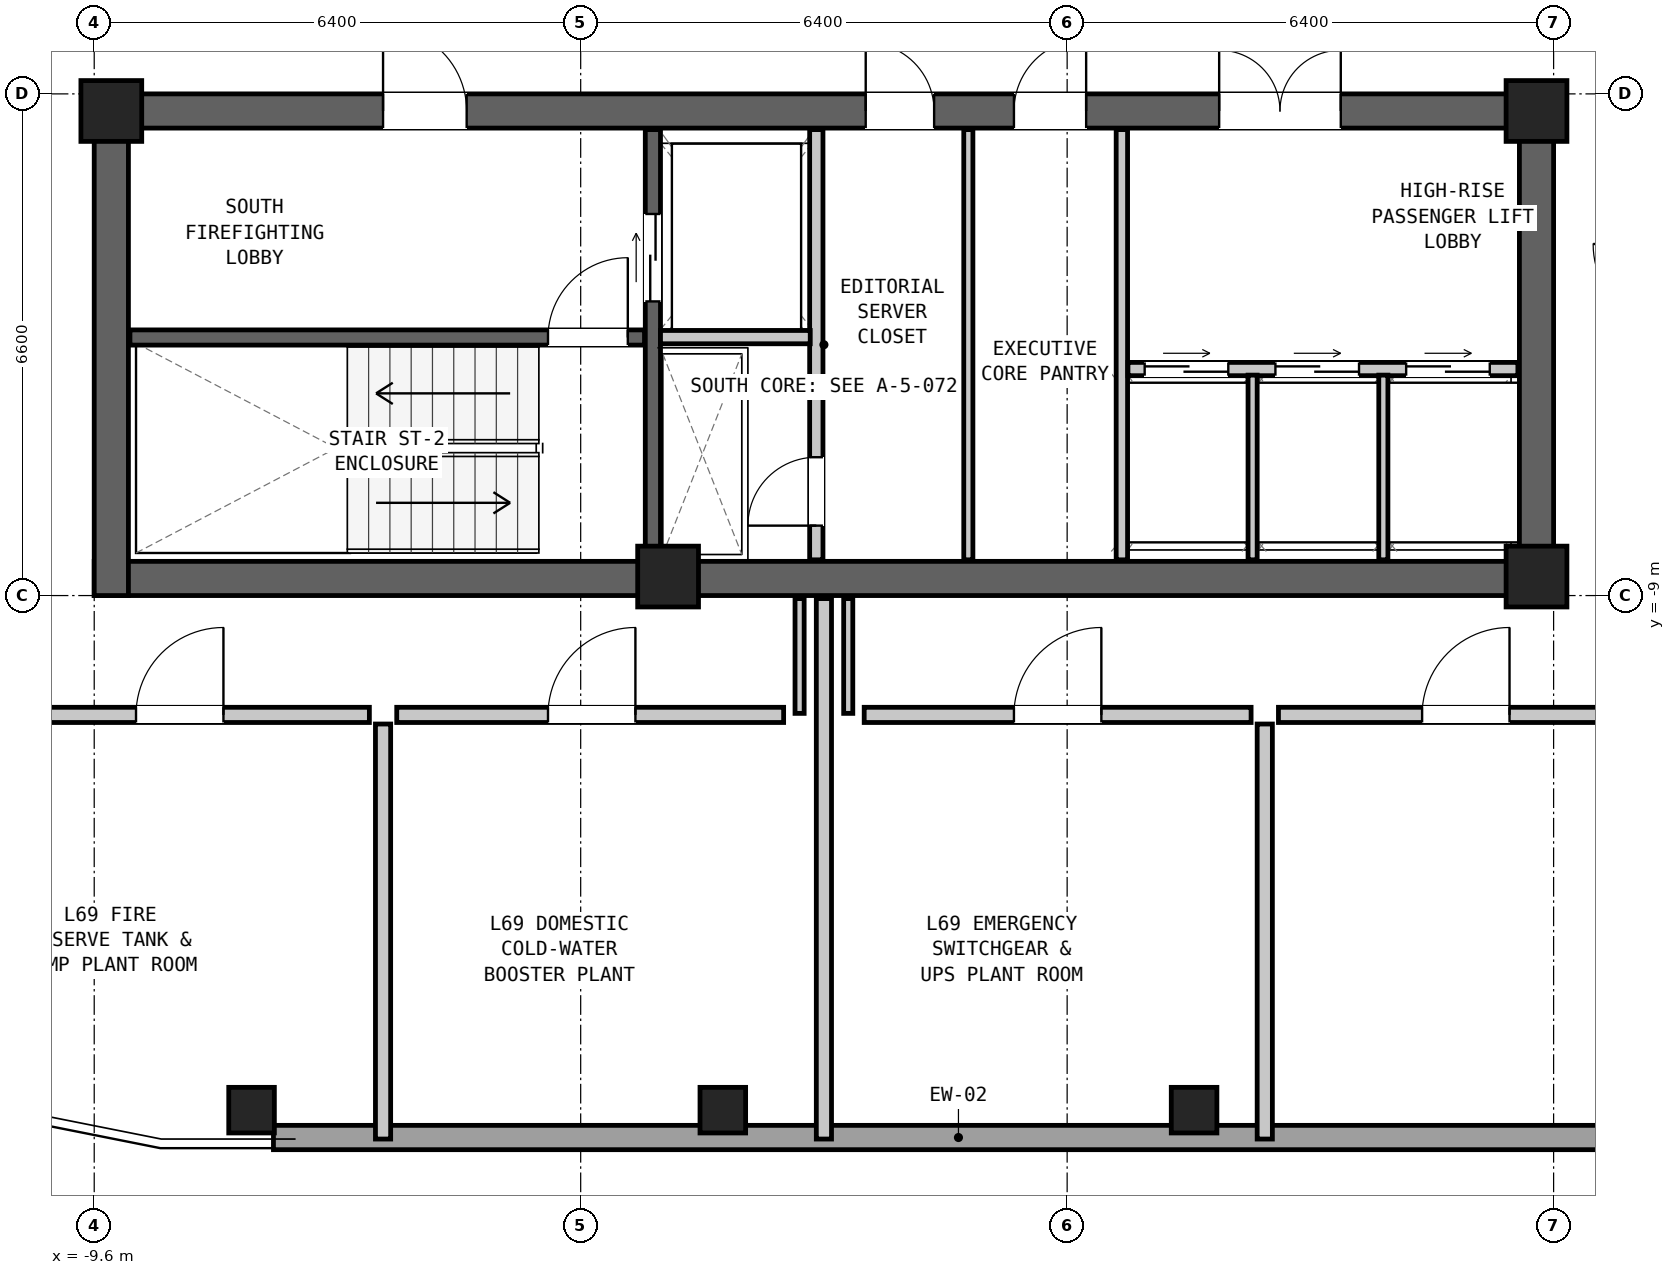
"""IFC4 building model, lengths in metres.
Left out: names, types, materials, properties, quantities, classifications, styles, units other than length and angle.
Written with IfcOpenShell. Run it as: python <this file> out.ifc"""

import sys

from ifc_helpers import new_model, si_unit, direction, frame, frame_2d, origin, origin_2d, place, context, subcontext, project, spatial, rectangle, hollow_rectangle, extrude, element, fill, save


model = new_model("IFC4")
c1 = context("Model", 3, precision=1e-05, world=origin(), true_north=direction((0.0, 1.0)))
c2 = subcontext(c1, "Body", "Model", "MODEL_VIEW")
j1 = project(units=[si_unit("LENGTHUNIT", "METRE"), si_unit("PLANEANGLEUNIT", "RADIAN")], contexts=[c1])
p1 = place(None, origin())
s1 = spatial("IfcSite", under=j1, at=p1, CompositionType="ELEMENT")
p2 = place(p1, origin())
s2 = spatial("IfcBuilding", under=s1, at=p2, CompositionType="ELEMENT")
p3 = place(p2, frame((0.0, 0.0, 234.9)))
s3 = spatial("IfcBuildingStorey", under=s2, at=p3, CompositionType="ELEMENT", Elevation=234.9)
p4 = place(p3, frame((-9.6, -8.775, 0.0), z_axis=(0.0, 0.0, 1.0), x_axis=(1.0, 0.0, 0.0)))
e1 = element("IfcWall", 1, at=p4, inside=s3, PredefinedType="SHEAR", context=c2, shape_type="SweptSolid", body=[
    extrude(rectangle(XDim=19.2, YDim=0.45, at=frame_2d((9.6, 0.0))), origin(), (0.0, 0.0, 1.0), 3.6),
])
p5 = place(p3, frame((-9.6, -2.625, 0.0), z_axis=(0.0, 0.0, 1.0), x_axis=(1.0, 0.0, 0.0)))
e2 = element("IfcWall", 2, at=p5, inside=s3, PredefinedType="SHEAR", context=c2, shape_type="SweptSolid", body=[
    extrude(rectangle(XDim=19.2, YDim=0.45, at=frame_2d((9.6, 0.0))), origin(), (0.0, 0.0, 1.0), 3.6),
])
p6 = place(p5, frame((3.8, 0.0, 0.0)))
e3 = element("IfcOpeningElement", 3, at=p6, cuts=e2, PredefinedType="OPENING", context=c2, shape_type="SweptSolid", body=[
    extrude(rectangle(XDim=1.1, YDim=2.08, at=frame_2d((0.55, 1.04))), frame((0.0, 0.237, 0.0), z_axis=(0.0, -1.0, 0.0), x_axis=(1.0, 0.0, 0.0)), (0.0, 0.0, 1.0), 0.474),
])
p7 = place(p5, frame((10.15, 0.0, 0.0)))
e4 = element("IfcOpeningElement", 4, at=p7, cuts=e2, PredefinedType="OPENING", context=c2, shape_type="SweptSolid", body=[
    extrude(rectangle(XDim=0.9, YDim=2.05, at=frame_2d((0.45, 1.025))), frame((0.0, 0.237, 0.0), z_axis=(0.0, -1.0, 0.0), x_axis=(1.0, 0.0, 0.0)), (0.0, 0.0, 1.0), 0.474),
])
p8 = place(p5, frame((12.1, 0.0, 0.0)))
e5 = element("IfcOpeningElement", 5, at=p8, cuts=e2, PredefinedType="OPENING", context=c2, shape_type="SweptSolid", body=[
    extrude(rectangle(XDim=0.95, YDim=2.1, at=frame_2d((0.475, 1.05))), frame((0.0, 0.237, 0.0), z_axis=(0.0, -1.0, 0.0), x_axis=(1.0, 0.0, 0.0)), (0.0, 0.0, 1.0), 0.474),
])
p9 = place(p5, frame((14.8, 0.0, 0.0)))
e6 = element("IfcOpeningElement", 6, at=p9, cuts=e2, PredefinedType="OPENING", context=c2, shape_type="SweptSolid", body=[
    extrude(rectangle(XDim=1.6, YDim=2.12, at=frame_2d((0.8, 1.06))), frame((0.0, 0.237, 0.0), z_axis=(0.0, -1.0, 0.0), x_axis=(1.0, 0.0, 0.0)), (0.0, 0.0, 1.0), 0.474),
])
for number, where, z_axis, x_axis in (
    (7, (-9.375, -9.0, 0.0), (0.0, 0.0, 1.0), (0.0, 1.0, 0.0)),
    (8, (9.375, -9.0, 0.0), (0.0, 0.0, 1.0), (0.0, 1.0, 0.0)),
):
    element("IfcWall", number, at=place(p3, frame(where, z_axis=z_axis, x_axis=x_axis)), inside=s3, PredefinedType="SHEAR", context=c2, shape_type="SweptSolid", body=[
        extrude(rectangle(XDim=6.6, YDim=0.45, at=frame_2d((3.3, 0.0))), origin(), (0.0, 0.0, 1.0), 3.6),
    ])
for number, where, z_axis, x_axis in (
    (9, (-7.53, -15.77, 0.0), (0.0, 0.0, 1.0), (1.0, 0.0, 0.0)),
    (10, (-1.33, -15.77, 0.0), (0.0, 0.0, 1.0), (1.0, 0.0, 0.0)),
    (11, (4.87, -15.77, 0.0), (0.0, 0.0, 1.0), (1.0, 0.0, 0.0)),
):
    element("IfcColumn", number, at=place(p3, frame(where, z_axis=z_axis, x_axis=x_axis)), inside=s3, PredefinedType="COLUMN", context=c2, shape_type="SweptSolid", body=[
        extrude(hollow_rectangle(XDim=0.6, YDim=0.6, WallThickness=0.04, at=origin_2d()), origin(), (0.0, 0.0, 1.0), 3.6),
    ])
for number, where, z_axis, x_axis in (
    (12, (-9.375, -2.625, 0.0), (0.0, 0.0, 1.0), (1.0, 0.0, 0.0)),
    (13, (9.375, -2.625, 0.0), (0.0, 0.0, 1.0), (1.0, 0.0, 0.0)),
    (14, (-2.05, -8.75, 0.0), (0.0, 0.0, 1.0), (1.0, 0.0, 0.0)),
    (15, (9.375, -8.75, 0.0), (0.0, 0.0, 1.0), (1.0, 0.0, 0.0)),
):
    element("IfcColumn", number, at=place(p3, frame(where, z_axis=z_axis, x_axis=x_axis)), inside=s3, PredefinedType="COLUMN", context=c2, shape_type="SweptSolid", body=[
        extrude(rectangle(XDim=0.8, YDim=0.8, at=origin_2d()), origin(), (0.0, 0.0, 1.0), 3.6),
    ])
p10 = place(p3, frame((10.782, -16.13, 0.0), z_axis=(0.0, 0.0, 1.0), x_axis=(-1.0, 0.0, 0.0)))
e16 = element("IfcWall", 16, at=p10, inside=s3, PredefinedType="SOLIDWALL", context=c2, shape_type="SweptSolid", body=[
    extrude(rectangle(XDim=18.024, YDim=0.32, at=frame_2d((9.012, 0.0))), origin(), (0.0, 0.0, 1.0), 2.082),
])
p11 = place(p3, frame((-9.13, -5.605, 0.0), z_axis=(0.0, 0.0, 1.0), x_axis=(1.0, 0.0, 0.0)))
e17 = element("IfcWall", 17, at=p11, inside=s3, PredefinedType="SHEAR", context=c2, shape_type="SweptSolid", body=[
    extrude(rectangle(XDim=6.77, YDim=0.2, at=frame_2d((3.385, 0.0))), origin(), (0.0, 0.0, 1.0), 3.22),
])
p12 = place(p11, frame((5.5, 0.0, 0.0)))
e18 = element("IfcOpeningElement", 18, at=p12, cuts=e17, PredefinedType="OPENING", context=c2, shape_type="SweptSolid", body=[
    extrude(rectangle(XDim=1.05, YDim=2.08, at=frame_2d((0.525, 1.04))), frame((0.0, 0.112, 0.0), z_axis=(0.0, -1.0, 0.0), x_axis=(1.0, 0.0, 0.0)), (0.0, 0.0, 1.0), 0.224),
])
p13 = place(p3, frame((-2.25, -8.53, 0.0), z_axis=(0.0, 0.0, 1.0), x_axis=(0.0, 1.0, 0.0)))
e19 = element("IfcWall", 19, at=p13, inside=s3, PredefinedType="SHEAR", context=c2, shape_type="SweptSolid", body=[
    extrude(rectangle(XDim=5.66, YDim=0.2, at=frame_2d((2.83, 0.0))), origin(), (0.0, 0.0, 1.0), 3.22),
])
p14 = place(p13, frame((3.4, 0.0, 0.0)))
e20 = element("IfcOpeningElement", 20, at=p14, cuts=e19, PredefinedType="OPENING", context=c2, shape_type="SweptSolid", body=[
    extrude(rectangle(XDim=1.15, YDim=2.08, at=frame_2d((0.575, 1.04))), frame((0.0, 0.112, 0.0), z_axis=(0.0, -1.0, 0.0), x_axis=(1.0, 0.0, 0.0)), (0.0, 0.0, 1.0), 0.224),
])
p15 = place(p3, frame((-0.1, -8.53, 0.0), z_axis=(0.0, 0.0, 1.0), x_axis=(0.0, 1.0, 0.0)))
e21 = element("IfcWall", 21, at=p15, inside=s3, PredefinedType="PARTITIONING", context=c2, shape_type="SweptSolid", body=[
    extrude(rectangle(XDim=5.66, YDim=0.175, at=frame_2d((2.83, 0.0))), origin(), (0.0, 0.0, 1.0), 3.22),
])
p16 = place(p15, frame((0.45, 0.0, 0.0)))
e22 = element("IfcOpeningElement", 22, at=p16, cuts=e21, PredefinedType="OPENING", context=c2, shape_type="SweptSolid", body=[
    extrude(rectangle(XDim=0.9, YDim=2.05, at=frame_2d((0.45, 1.025))), frame((0.0, 0.1, 0.0), z_axis=(0.0, -1.0, 0.0), x_axis=(1.0, 0.0, 0.0)), (0.0, 0.0, 1.0), 0.199),
])
p17 = place(p3, frame((-2.15, -5.6, 0.0), z_axis=(0.0, 0.0, 1.0), x_axis=(1.0, 0.0, 0.0)))
e23 = element("IfcWall", 23, at=p17, inside=s3, PredefinedType="PARTITIONING", context=c2, shape_type="SweptSolid", body=[
    extrude(rectangle(XDim=1.97, YDim=0.175, at=frame_2d((0.985, 0.0))), origin(), (0.0, 0.0, 1.0), 3.22),
])
p18 = place(p3, frame((3.92, -8.53, 0.0), z_axis=(0.0, 0.0, 1.0), x_axis=(0.0, 1.0, 0.0)))
e24 = element("IfcWall", 24, at=p18, inside=s3, PredefinedType="PARTITIONING", context=c2, shape_type="SweptSolid", body=[
    extrude(rectangle(XDim=5.66, YDim=0.15, at=frame_2d((2.83, 0.0))), origin(), (0.0, 0.0, 1.0), 3.22),
])
p19 = place(p3, frame((1.9, -8.53, 0.0), z_axis=(0.0, 0.0, 1.0), x_axis=(0.0, 1.0, 0.0)))
e25 = element("IfcWall", 25, at=p19, inside=s3, PredefinedType="PARTITIONING", context=c2, shape_type="SweptSolid", body=[
    extrude(rectangle(XDim=5.66, YDim=0.12, at=frame_2d((2.83, 0.0))), origin(), (0.0, 0.0, 1.0), 3.22),
])
p20 = place(p3, frame((4.0, -6.02, 0.0), z_axis=(0.0, 0.0, 1.0), x_axis=(1.0, 0.0, 0.0)))
e26 = element("IfcWall", 26, at=p20, inside=s3, PredefinedType="PARTITIONING", context=c2, shape_type="SweptSolid", body=[
    extrude(rectangle(XDim=5.13, YDim=0.175, at=frame_2d((2.565, 0.0))), origin(), (0.0, 0.0, 1.0), 3.22),
])
p21 = place(p20, frame((0.22, 0.0, 0.0)))
e27 = element("IfcOpeningElement", 27, at=p21, cuts=e26, PredefinedType="OPENING", context=c2, shape_type="SweptSolid", body=[
    extrude(rectangle(XDim=1.1, YDim=2.06, at=frame_2d((0.55, 1.03))), frame((0.0, 0.1, 0.0), z_axis=(0.0, -1.0, 0.0), x_axis=(1.0, 0.0, 0.0)), (0.0, 0.0, 1.0), 0.199),
])
p22 = place(p20, frame((1.94, 0.0, 0.0)))
e28 = element("IfcOpeningElement", 28, at=p22, cuts=e26, PredefinedType="OPENING", context=c2, shape_type="SweptSolid", body=[
    extrude(rectangle(XDim=1.1, YDim=2.06, at=frame_2d((0.55, 1.03))), frame((0.0, 0.1, 0.0), z_axis=(0.0, -1.0, 0.0), x_axis=(1.0, 0.0, 0.0)), (0.0, 0.0, 1.0), 0.199),
])
p23 = place(p20, frame((3.66, 0.0, 0.0)))
e29 = element("IfcOpeningElement", 29, at=p23, cuts=e26, PredefinedType="OPENING", context=c2, shape_type="SweptSolid", body=[
    extrude(rectangle(XDim=1.1, YDim=2.06, at=frame_2d((0.55, 1.03))), frame((0.0, 0.1, 0.0), z_axis=(0.0, -1.0, 0.0), x_axis=(1.0, 0.0, 0.0)), (0.0, 0.0, 1.0), 0.199),
])
for number, where, z_axis, x_axis in (
    (30, (5.64, -8.53, 0.0), (0.0, 0.0, 1.0), (0.0, 1.0, 0.0)),
    (31, (7.36, -8.53, 0.0), (0.0, 0.0, 1.0), (0.0, 1.0, 0.0)),
):
    element("IfcWall", number, at=place(p3, frame(where, z_axis=z_axis, x_axis=x_axis)), inside=s3, PredefinedType="PARTITIONING", context=c2, shape_type="SweptSolid", body=[
        extrude(rectangle(XDim=2.43, YDim=0.12, at=frame_2d((1.215, 0.0))), origin(), (0.0, 0.0, 1.0), 3.22),
    ])
p24 = place(p3, frame((0.0, -16.15, 0.0), z_axis=(0.0, 0.0, 1.0), x_axis=(0.0, 1.0, 0.0)))
e32 = element("IfcWall", 32, at=p24, inside=s3, PredefinedType="PARTITIONING", context=c2, shape_type="SweptSolid", body=[
    extrude(rectangle(XDim=7.11, YDim=0.2, at=frame_2d((3.555, 0.0))), origin(), (0.0, 0.0, 1.0), 2.438),
])
for number, where, z_axis, x_axis in (
    (33, (-0.32, -10.55, 0.0), (0.0, 0.0, 1.0), (0.0, 1.0, 0.0)),
    (34, (0.32, -10.55, 0.0), (0.0, 0.0, 1.0), (0.0, 1.0, 0.0)),
):
    element("IfcWall", number, at=place(p3, frame(where, z_axis=z_axis, x_axis=x_axis)), inside=s3, PredefinedType="PARTITIONING", context=c2, shape_type="SweptSolid", body=[
        extrude(rectangle(XDim=1.51, YDim=0.12, at=frame_2d((0.755, 0.0))), origin(), (0.0, 0.0, 1.0), 2.438),
    ])
p25 = place(p3, frame((-10.97, -10.57, 0.0), z_axis=(0.0, 0.0, 1.0), x_axis=(1.0, 0.0, 0.0)))
e35 = element("IfcWall", 35, at=p25, inside=s3, PredefinedType="PARTITIONING", context=c2, shape_type="SweptSolid", body=[
    extrude(rectangle(XDim=4.99, YDim=0.2, at=frame_2d((2.495, 0.0))), origin(), (0.0, 0.0, 1.0), 3.22),
])
p26 = place(p25, frame((1.92, 0.0, 0.0)))
e36 = element("IfcOpeningElement", 36, at=p26, cuts=e35, PredefinedType="OPENING", context=c2, shape_type="SweptSolid", body=[
    extrude(rectangle(XDim=1.15, YDim=2.1, at=frame_2d((0.575, 1.05))), frame((0.0, 0.112, 0.0), z_axis=(0.0, -1.0, 0.0), x_axis=(1.0, 0.0, 0.0)), (0.0, 0.0, 1.0), 0.224),
])
p27 = place(p3, frame((-5.8, -16.15, 0.0), z_axis=(0.0, 0.0, 1.0), x_axis=(0.0, 1.0, 0.0)))
e37 = element("IfcWall", 37, at=p27, inside=s3, PredefinedType="PARTITIONING", context=c2, shape_type="SweptSolid", body=[
    extrude(rectangle(XDim=5.46, YDim=0.2, at=frame_2d((2.73, 0.0))), origin(), (0.0, 0.0, 1.0), 2.438),
])
p28 = place(p3, frame((-5.62, -10.57, 0.0), z_axis=(0.0, 0.0, 1.0), x_axis=(1.0, 0.0, 0.0)))
e38 = element("IfcWall", 38, at=p28, inside=s3, PredefinedType="PARTITIONING", context=c2, shape_type="SweptSolid", body=[
    extrude(rectangle(XDim=5.09, YDim=0.2, at=frame_2d((2.545, 0.0))), origin(), (0.0, 0.0, 1.0), 3.22),
])
p29 = place(p28, frame((1.99, 0.0, 0.0)))
e39 = element("IfcOpeningElement", 39, at=p29, cuts=e38, PredefinedType="OPENING", context=c2, shape_type="SweptSolid", body=[
    extrude(rectangle(XDim=1.15, YDim=2.1, at=frame_2d((0.575, 1.05))), frame((0.0, 0.112, 0.0), z_axis=(0.0, -1.0, 0.0), x_axis=(1.0, 0.0, 0.0)), (0.0, 0.0, 1.0), 0.224),
])
p30 = place(p3, frame((0.53, -10.57, 0.0), z_axis=(0.0, 0.0, 1.0), x_axis=(1.0, 0.0, 0.0)))
e40 = element("IfcWall", 40, at=p30, inside=s3, PredefinedType="PARTITIONING", context=c2, shape_type="SweptSolid", body=[
    extrude(rectangle(XDim=5.09, YDim=0.2, at=frame_2d((2.545, 0.0))), origin(), (0.0, 0.0, 1.0), 3.22),
])
p31 = place(p30, frame((1.97, 0.0, 0.0)))
e41 = element("IfcOpeningElement", 41, at=p31, cuts=e40, PredefinedType="OPENING", context=c2, shape_type="SweptSolid", body=[
    extrude(rectangle(XDim=1.15, YDim=2.1, at=frame_2d((0.575, 1.05))), frame((0.0, 0.112, 0.0), z_axis=(0.0, -1.0, 0.0), x_axis=(1.0, 0.0, 0.0)), (0.0, 0.0, 1.0), 0.224),
])
p32 = place(p3, frame((5.8, -16.15, 0.0), z_axis=(0.0, 0.0, 1.0), x_axis=(0.0, 1.0, 0.0)))
e42 = element("IfcWall", 42, at=p32, inside=s3, PredefinedType="PARTITIONING", context=c2, shape_type="SweptSolid", body=[
    extrude(rectangle(XDim=5.46, YDim=0.2, at=frame_2d((2.73, 0.0))), origin(), (0.0, 0.0, 1.0), 2.438),
])
p33 = place(p3, frame((5.98, -10.57, 0.0), z_axis=(0.0, 0.0, 1.0), x_axis=(1.0, 0.0, 0.0)))
e43 = element("IfcWall", 43, at=p33, inside=s3, PredefinedType="PARTITIONING", context=c2, shape_type="SweptSolid", body=[
    extrude(rectangle(XDim=4.99, YDim=0.2, at=frame_2d((2.495, 0.0))), origin(), (0.0, 0.0, 1.0), 3.22),
])
p34 = place(p33, frame((1.89, 0.0, 0.0)))
e44 = element("IfcOpeningElement", 44, at=p34, cuts=e43, PredefinedType="OPENING", context=c2, shape_type="SweptSolid", body=[
    extrude(rectangle(XDim=1.15, YDim=2.1, at=frame_2d((0.575, 1.05))), frame((0.0, 0.112, 0.0), z_axis=(0.0, -1.0, 0.0), x_axis=(1.0, 0.0, 0.0)), (0.0, 0.0, 1.0), 0.224),
])
p35 = place(p12, origin())
e45 = element("IfcDoor", 45, at=p35, inside=s3, OperationType="SINGLE_SWING_RIGHT", PredefinedType="DOOR", context=c2, shape_type="SweptSolid", body=[
    extrude(rectangle(XDim=1.05, YDim=2.08, at=frame_2d((0.525, 1.04))), frame((0.0, 0.025, 0.0), z_axis=(0.0, -1.0, 0.0), x_axis=(1.0, 0.0, 0.0)), (0.0, 0.0, 1.0), 0.05),
])
fill(e18, e45)
p36 = place(p6, origin())
e46 = element("IfcDoor", 46, at=p36, inside=s3, OperationType="SINGLE_SWING_LEFT", PredefinedType="DOOR", context=c2, shape_type="SweptSolid", body=[
    extrude(rectangle(XDim=1.1, YDim=2.08, at=frame_2d((0.55, 1.04))), frame((0.0, 0.025, 0.0), z_axis=(0.0, -1.0, 0.0), x_axis=(1.0, 0.0, 0.0)), (0.0, 0.0, 1.0), 0.05),
])
fill(e3, e46)
p37 = place(p14, origin())
e47 = element("IfcDoor", 47, at=p37, inside=s3, OperationType="DOUBLE_DOOR_SLIDING", PredefinedType="DOOR", context=c2, shape_type="SweptSolid", body=[
    extrude(rectangle(XDim=1.15, YDim=2.08, at=frame_2d((0.575, 1.04))), frame((0.0, 0.025, 0.0), z_axis=(0.0, -1.0, 0.0), x_axis=(1.0, 0.0, 0.0)), (0.0, 0.0, 1.0), 0.05),
])
fill(e20, e47)
p38 = place(p16, origin())
e48 = element("IfcDoor", 48, at=p38, inside=s3, OperationType="SINGLE_SWING_LEFT", PredefinedType="DOOR", context=c2, shape_type="SweptSolid", body=[
    extrude(rectangle(XDim=0.9, YDim=2.05, at=frame_2d((0.45, 1.025))), frame((0.0, 0.025, 0.0), z_axis=(0.0, -1.0, 0.0), x_axis=(1.0, 0.0, 0.0)), (0.0, 0.0, 1.0), 0.05),
])
fill(e22, e48)
p39 = place(p7, origin())
e49 = element("IfcDoor", 49, at=p39, inside=s3, OperationType="SINGLE_SWING_LEFT", PredefinedType="DOOR", context=c2, shape_type="SweptSolid", body=[
    extrude(rectangle(XDim=0.9, YDim=2.05, at=frame_2d((0.45, 1.025))), frame((0.0, 0.025, 0.0), z_axis=(0.0, -1.0, 0.0), x_axis=(1.0, 0.0, 0.0)), (0.0, 0.0, 1.0), 0.05),
])
fill(e4, e49)
p40 = place(p8, origin())
e50 = element("IfcDoor", 50, at=p40, inside=s3, OperationType="SINGLE_SWING_RIGHT", PredefinedType="DOOR", context=c2, shape_type="SweptSolid", body=[
    extrude(rectangle(XDim=0.95, YDim=2.1, at=frame_2d((0.475, 1.05))), frame((0.0, 0.025, 0.0), z_axis=(0.0, -1.0, 0.0), x_axis=(1.0, 0.0, 0.0)), (0.0, 0.0, 1.0), 0.05),
])
fill(e5, e50)
p41 = place(p21, origin())
e51 = element("IfcDoor", 51, at=p41, inside=s3, OperationType="DOUBLE_DOOR_SLIDING", PredefinedType="DOOR", context=c2, shape_type="SweptSolid", body=[
    extrude(rectangle(XDim=1.1, YDim=2.06, at=frame_2d((0.55, 1.03))), frame((0.0, 0.025, 0.0), z_axis=(0.0, -1.0, 0.0), x_axis=(1.0, 0.0, 0.0)), (0.0, 0.0, 1.0), 0.05),
])
fill(e27, e51)
p42 = place(p22, origin())
e52 = element("IfcDoor", 52, at=p42, inside=s3, OperationType="DOUBLE_DOOR_SLIDING", PredefinedType="DOOR", context=c2, shape_type="SweptSolid", body=[
    extrude(rectangle(XDim=1.1, YDim=2.06, at=frame_2d((0.55, 1.03))), frame((0.0, 0.025, 0.0), z_axis=(0.0, -1.0, 0.0), x_axis=(1.0, 0.0, 0.0)), (0.0, 0.0, 1.0), 0.05),
])
fill(e28, e52)
p43 = place(p23, origin())
e53 = element("IfcDoor", 53, at=p43, inside=s3, OperationType="DOUBLE_DOOR_SLIDING", PredefinedType="DOOR", context=c2, shape_type="SweptSolid", body=[
    extrude(rectangle(XDim=1.1, YDim=2.06, at=frame_2d((0.55, 1.03))), frame((0.0, 0.025, 0.0), z_axis=(0.0, -1.0, 0.0), x_axis=(1.0, 0.0, 0.0)), (0.0, 0.0, 1.0), 0.05),
])
fill(e29, e53)
p44 = place(p9, origin())
e54 = element("IfcDoor", 54, at=p44, inside=s3, OperationType="DOUBLE_DOOR_SINGLE_SWING", PredefinedType="DOOR", context=c2, shape_type="SweptSolid", body=[
    extrude(rectangle(XDim=1.6, YDim=2.12, at=frame_2d((0.8, 1.06))), frame((0.0, 0.025, 0.0), z_axis=(0.0, -1.0, 0.0), x_axis=(1.0, 0.0, 0.0)), (0.0, 0.0, 1.0), 0.05),
])
fill(e6, e54)
p45 = place(p26, origin())
e55 = element("IfcDoor", 55, at=p45, inside=s3, OperationType="SINGLE_SWING_RIGHT", PredefinedType="DOOR", context=c2, shape_type="SweptSolid", body=[
    extrude(rectangle(XDim=1.15, YDim=2.1, at=frame_2d((0.575, 1.05))), frame((0.0, 0.025, 0.0), z_axis=(0.0, -1.0, 0.0), x_axis=(1.0, 0.0, 0.0)), (0.0, 0.0, 1.0), 0.05),
])
fill(e36, e55)
p46 = place(p29, origin())
e56 = element("IfcDoor", 56, at=p46, inside=s3, OperationType="SINGLE_SWING_RIGHT", PredefinedType="DOOR", context=c2, shape_type="SweptSolid", body=[
    extrude(rectangle(XDim=1.15, YDim=2.1, at=frame_2d((0.575, 1.05))), frame((0.0, 0.025, 0.0), z_axis=(0.0, -1.0, 0.0), x_axis=(1.0, 0.0, 0.0)), (0.0, 0.0, 1.0), 0.05),
])
fill(e39, e56)
p47 = place(p31, origin())
e57 = element("IfcDoor", 57, at=p47, inside=s3, OperationType="SINGLE_SWING_RIGHT", PredefinedType="DOOR", context=c2, shape_type="SweptSolid", body=[
    extrude(rectangle(XDim=1.15, YDim=2.1, at=frame_2d((0.575, 1.05))), frame((0.0, 0.025, 0.0), z_axis=(0.0, -1.0, 0.0), x_axis=(1.0, 0.0, 0.0)), (0.0, 0.0, 1.0), 0.05),
])
fill(e41, e57)
p48 = place(p34, origin())
e58 = element("IfcDoor", 58, at=p48, inside=s3, OperationType="SINGLE_SWING_RIGHT", PredefinedType="DOOR", context=c2, shape_type="SweptSolid", body=[
    extrude(rectangle(XDim=1.15, YDim=2.1, at=frame_2d((0.575, 1.05))), frame((0.0, 0.025, 0.0), z_axis=(0.0, -1.0, 0.0), x_axis=(1.0, 0.0, 0.0)), (0.0, 0.0, 1.0), 0.05),
])
fill(e44, e58)
save(model, sys.argv[1])
